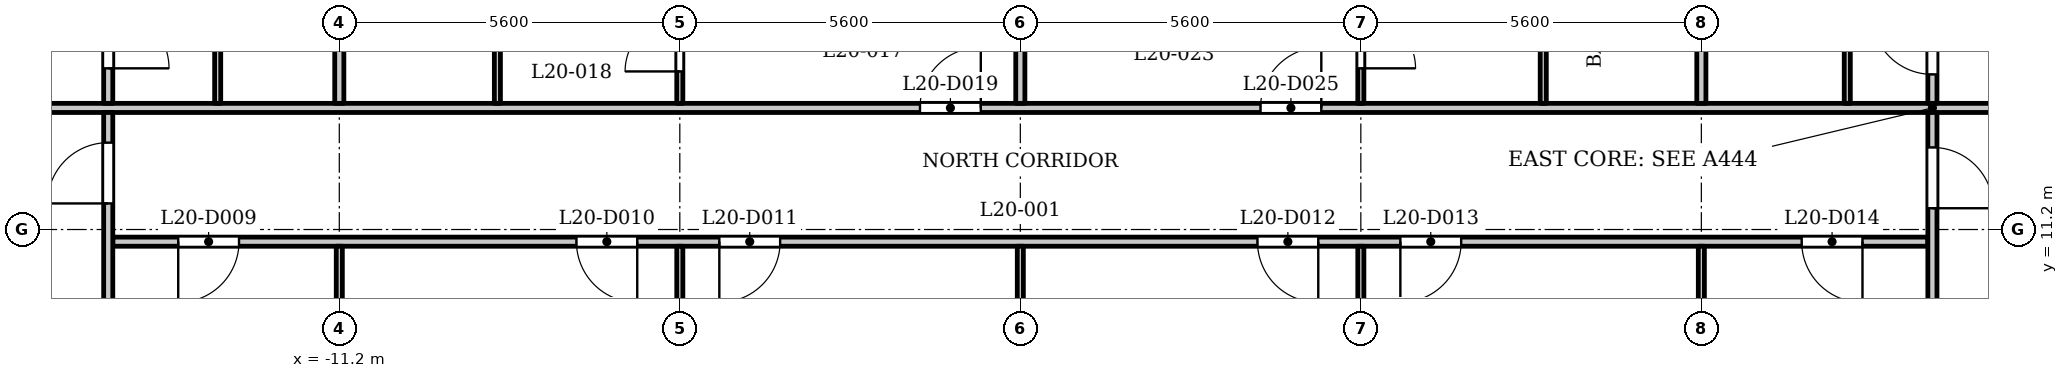
"""IFC4 building model, lengths in metres.
Left out: names, types, materials, properties, quantities, classifications, styles, units other than length and angle.
Written with IfcOpenShell. Run it as: python <this file> out.ifc"""

import sys

from ifc_helpers import new_model, si_unit, direction, frame, frame_2d, origin, place, context, subcontext, project, spatial, rectangle, extrude, element, fill, save


model = new_model("IFC4")
c1 = context("Model", 3, precision=1e-05, world=origin(), true_north=direction((0.0, 1.0)))
c2 = subcontext(c1, "Body", "Model", "MODEL_VIEW")
j1 = project(units=[si_unit("LENGTHUNIT", "METRE"), si_unit("PLANEANGLEUNIT", "RADIAN")], contexts=[c1])
p1 = place(None, origin())
s1 = spatial("IfcSite", under=j1, at=p1, CompositionType="ELEMENT")
p2 = place(p1, origin())
s2 = spatial("IfcBuilding", under=s1, at=p2, CompositionType="ELEMENT")
p3 = place(p2, frame((0.0, 0.0, 83.3)))
s3 = spatial("IfcBuildingStorey", under=s2, at=p3, CompositionType="ELEMENT", Elevation=83.3)
p4 = place(p3, frame((-14.925, 11.0, 0.0), z_axis=(0.0, 0.0, 1.0), x_axis=(1.0, 0.0, 0.0)))
e1 = element("IfcWall", 1, at=p4, inside=s3, PredefinedType="PARTITIONING", context=c2, shape_type="SweptSolid", body=[
    extrude(rectangle(XDim=29.85, YDim=0.15, at=frame_2d((14.925, 0.0))), origin(), (0.0, 0.0, 1.0), 3.2),
])
p5 = place(p4, frame((1.076, 0.0, 0.0)))
e2 = element("IfcOpeningElement", 2, at=p5, cuts=e1, PredefinedType="OPENING", context=c2, shape_type="SweptSolid", body=[
    extrude(rectangle(XDim=1.0, YDim=2.1, at=frame_2d((0.5, 1.05))), frame((0.0, 0.085, 0.0), z_axis=(0.0, -1.0, 0.0), x_axis=(1.0, 0.0, 0.0)), (0.0, 0.0, 1.0), 0.17),
])
p6 = place(p4, frame((7.625, 0.0, 0.0)))
e3 = element("IfcOpeningElement", 3, at=p6, cuts=e1, PredefinedType="OPENING", context=c2, shape_type="SweptSolid", body=[
    extrude(rectangle(XDim=1.0, YDim=2.1, at=frame_2d((0.5, 1.05))), frame((0.0, 0.085, 0.0), z_axis=(0.0, -1.0, 0.0), x_axis=(1.0, 0.0, 0.0)), (0.0, 0.0, 1.0), 0.17),
])
p7 = place(p4, frame((9.975, 0.0, 0.0)))
e4 = element("IfcOpeningElement", 4, at=p7, cuts=e1, PredefinedType="OPENING", context=c2, shape_type="SweptSolid", body=[
    extrude(rectangle(XDim=1.0, YDim=2.1, at=frame_2d((0.5, 1.05))), frame((0.0, 0.085, 0.0), z_axis=(0.0, -1.0, 0.0), x_axis=(1.0, 0.0, 0.0)), (0.0, 0.0, 1.0), 0.17),
])
p8 = place(p4, frame((18.825, 0.0, 0.0)))
e5 = element("IfcOpeningElement", 5, at=p8, cuts=e1, PredefinedType="OPENING", context=c2, shape_type="SweptSolid", body=[
    extrude(rectangle(XDim=1.0, YDim=2.1, at=frame_2d((0.5, 1.05))), frame((0.0, 0.085, 0.0), z_axis=(0.0, -1.0, 0.0), x_axis=(1.0, 0.0, 0.0)), (0.0, 0.0, 1.0), 0.17),
])
p9 = place(p4, frame((21.175, 0.0, 0.0)))
e6 = element("IfcOpeningElement", 6, at=p9, cuts=e1, PredefinedType="OPENING", context=c2, shape_type="SweptSolid", body=[
    extrude(rectangle(XDim=1.0, YDim=2.1, at=frame_2d((0.5, 1.05))), frame((0.0, 0.085, 0.0), z_axis=(0.0, -1.0, 0.0), x_axis=(1.0, 0.0, 0.0)), (0.0, 0.0, 1.0), 0.17),
])
p10 = place(p4, frame((27.775, 0.0, 0.0)))
e7 = element("IfcOpeningElement", 7, at=p10, cuts=e1, PredefinedType="OPENING", context=c2, shape_type="SweptSolid", body=[
    extrude(rectangle(XDim=1.0, YDim=2.1, at=frame_2d((0.5, 1.05))), frame((0.0, 0.085, 0.0), z_axis=(0.0, -1.0, 0.0), x_axis=(1.0, 0.0, 0.0)), (0.0, 0.0, 1.0), 0.17),
])
p11 = place(p3, frame((-17.4, 13.2, 0.0), z_axis=(0.0, 0.0, 1.0), x_axis=(1.0, 0.0, 0.0)))
e8 = element("IfcWall", 8, at=p11, inside=s3, PredefinedType="PARTITIONING", context=c2, shape_type="SweptSolid", body=[
    extrude(rectangle(XDim=34.8, YDim=0.15, at=frame_2d((17.4, 0.0))), origin(), (0.0, 0.0, 1.0), 3.2),
])
p12 = place(p11, frame((0.25, 0.0, 0.0)))
e9 = element("IfcOpeningElement", 9, at=p12, cuts=e8, PredefinedType="OPENING", context=c2, shape_type="SweptSolid", body=[
    extrude(rectangle(XDim=1.0, YDim=2.1, at=frame_2d((0.5, 1.05))), frame((0.0, 0.085, 0.0), z_axis=(0.0, -1.0, 0.0), x_axis=(1.0, 0.0, 0.0)), (0.0, 0.0, 1.0), 0.17),
])
p13 = place(p11, frame((33.65, 0.0, 0.0)))
e10 = element("IfcOpeningElement", 10, at=p13, cuts=e8, PredefinedType="OPENING", context=c2, shape_type="SweptSolid", body=[
    extrude(rectangle(XDim=1.0, YDim=2.1, at=frame_2d((0.5, 1.05))), frame((0.0, 0.085, 0.0), z_axis=(0.0, -1.0, 0.0), x_axis=(1.0, 0.0, 0.0)), (0.0, 0.0, 1.0), 0.17),
])
p14 = place(p11, frame((15.75, 0.0, 0.0)))
e11 = element("IfcOpeningElement", 11, at=p14, cuts=e8, PredefinedType="OPENING", context=c2, shape_type="SweptSolid", body=[
    extrude(rectangle(XDim=1.0, YDim=2.1, at=frame_2d((0.5, 1.05))), frame((0.0, 0.085, 0.0), z_axis=(0.0, -1.0, 0.0), x_axis=(1.0, 0.0, 0.0)), (0.0, 0.0, 1.0), 0.17),
])
p15 = place(p11, frame((21.35, 0.0, 0.0)))
e12 = element("IfcOpeningElement", 12, at=p15, cuts=e8, PredefinedType="OPENING", context=c2, shape_type="SweptSolid", body=[
    extrude(rectangle(XDim=1.0, YDim=2.1, at=frame_2d((0.5, 1.05))), frame((0.0, 0.085, 0.0), z_axis=(0.0, -1.0, 0.0), x_axis=(1.0, 0.0, 0.0)), (0.0, 0.0, 1.0), 0.17),
])
p16 = place(p3, frame((-15.0, 6.769, 0.0), z_axis=(0.0, 0.0, 1.0), x_axis=(0.0, 1.0, 0.0)))
e13 = element("IfcWall", 13, at=p16, inside=s3, PredefinedType="PARTITIONING", context=c2, shape_type="SweptSolid", body=[
    extrude(rectangle(XDim=6.356, YDim=0.15, at=frame_2d((3.178, 0.0))), origin(), (0.0, 0.0, 1.0), 3.2),
])
p17 = place(p16, frame((4.86, 0.0, 0.0)))
e14 = element("IfcOpeningElement", 14, at=p17, cuts=e13, PredefinedType="OPENING", context=c2, shape_type="SweptSolid", body=[
    extrude(rectangle(XDim=1.0, YDim=2.1, at=frame_2d((0.5, 1.05))), frame((0.0, 0.085, 0.0), z_axis=(0.0, -1.0, 0.0), x_axis=(1.0, 0.0, 0.0)), (0.0, 0.0, 1.0), 0.17),
])
p18 = place(p3, frame((-15.0, 13.275, 0.0), z_axis=(0.0, 0.0, 1.0), x_axis=(0.0, 1.0, 0.0)))
e15 = element("IfcWall", 15, at=p18, inside=s3, PredefinedType="PARTITIONING", context=c2, shape_type="SweptSolid", body=[
    extrude(rectangle(XDim=2.05, YDim=0.15, at=frame_2d((1.025, 0.0))), origin(), (0.0, 0.0, 1.0), 3.2),
])
p19 = place(p18, frame((0.576, 0.0, 0.0)))
e16 = element("IfcOpeningElement", 16, at=p19, cuts=e15, PredefinedType="OPENING", context=c2, shape_type="SweptSolid", body=[
    extrude(rectangle(XDim=1.0, YDim=2.1, at=frame_2d((0.5, 1.05))), frame((0.0, 0.085, 0.0), z_axis=(0.0, -1.0, 0.0), x_axis=(1.0, 0.0, 0.0)), (0.0, 0.0, 1.0), 0.17),
])
p20 = place(p3, frame((-13.2, 13.275, 0.0), z_axis=(0.0, 0.0, 1.0), x_axis=(0.0, 1.0, 0.0)))
e17 = element("IfcWall", 17, at=p20, inside=s3, PredefinedType="PARTITIONING", context=c2, shape_type="SweptSolid", body=[
    extrude(rectangle(XDim=3.775, YDim=0.1, at=frame_2d((1.888, 0.0))), origin(), (0.0, 0.0, 1.0), 3.2),
])
p21 = place(p3, frame((-11.2, 7.32, 0.0), z_axis=(0.0, 0.0, 1.0), x_axis=(0.0, 1.0, 0.0)))
e18 = element("IfcWall", 18, at=p21, inside=s3, PredefinedType="PARTITIONING", context=c2, shape_type="SweptSolid", body=[
    extrude(rectangle(XDim=3.605, YDim=0.1, at=frame_2d((1.802, 0.0))), origin(), (0.0, 0.0, 1.0), 3.2),
])
p22 = place(p3, frame((-11.2, 13.275, 0.0), z_axis=(0.0, 0.0, 1.0), x_axis=(0.0, 1.0, 0.0)))
e19 = element("IfcWall", 19, at=p22, inside=s3, PredefinedType="PARTITIONING", context=c2, shape_type="SweptSolid", body=[
    extrude(rectangle(XDim=3.775, YDim=0.15, at=frame_2d((1.888, 0.0))), origin(), (0.0, 0.0, 1.0), 3.2),
])
p23 = place(p3, frame((-8.6, 13.275, 0.0), z_axis=(0.0, 0.0, 1.0), x_axis=(0.0, 1.0, 0.0)))
e20 = element("IfcWall", 20, at=p23, inside=s3, PredefinedType="PARTITIONING", context=c2, shape_type="SweptSolid", body=[
    extrude(rectangle(XDim=3.775, YDim=0.1, at=frame_2d((1.888, 0.0))), origin(), (0.0, 0.0, 1.0), 3.2),
])
p24 = place(p3, frame((-5.6, 7.32, 0.0), z_axis=(0.0, 0.0, 1.0), x_axis=(0.0, 1.0, 0.0)))
e21 = element("IfcWall", 21, at=p24, inside=s3, PredefinedType="PARTITIONING", context=c2, shape_type="SweptSolid", body=[
    extrude(rectangle(XDim=3.605, YDim=0.1, at=frame_2d((1.802, 0.0))), origin(), (0.0, 0.0, 1.0), 3.2),
])
p25 = place(p3, frame((-5.6, 13.275, 0.0), z_axis=(0.0, 0.0, 1.0), x_axis=(0.0, 1.0, 0.0)))
e22 = element("IfcWall", 22, at=p25, inside=s3, PredefinedType="PARTITIONING", context=c2, shape_type="SweptSolid", body=[
    extrude(rectangle(XDim=3.775, YDim=0.1, at=frame_2d((1.888, 0.0))), origin(), (0.0, 0.0, 1.0), 3.2),
])
p26 = place(p25, frame((0.525, 0.0, 0.0)))
e23 = element("IfcOpeningElement", 23, at=p26, cuts=e22, PredefinedType="OPENING", context=c2, shape_type="SweptSolid", body=[
    extrude(rectangle(XDim=0.9, YDim=2.1, at=frame_2d((0.45, 1.05))), frame((0.0, 0.06, 0.0), z_axis=(0.0, -1.0, 0.0), x_axis=(1.0, 0.0, 0.0)), (0.0, 0.0, 1.0), 0.12),
])
p27 = place(p3, frame((0.0, 7.32, 0.0), z_axis=(0.0, 0.0, 1.0), x_axis=(0.0, 1.0, 0.0)))
e24 = element("IfcWall", 24, at=p27, inside=s3, PredefinedType="PARTITIONING", context=c2, shape_type="SweptSolid", body=[
    extrude(rectangle(XDim=3.605, YDim=0.1, at=frame_2d((1.802, 0.0))), origin(), (0.0, 0.0, 1.0), 3.2),
])
p28 = place(p3, frame((0.0, 13.275, 0.0), z_axis=(0.0, 0.0, 1.0), x_axis=(0.0, 1.0, 0.0)))
e25 = element("IfcWall", 25, at=p28, inside=s3, PredefinedType="PARTITIONING", context=c2, shape_type="SweptSolid", body=[
    extrude(rectangle(XDim=3.775, YDim=0.15, at=frame_2d((1.888, 0.0))), origin(), (0.0, 0.0, 1.0), 3.2),
])
p29 = place(p3, frame((5.6, 7.32, 0.0), z_axis=(0.0, 0.0, 1.0), x_axis=(0.0, 1.0, 0.0)))
e26 = element("IfcWall", 26, at=p29, inside=s3, PredefinedType="PARTITIONING", context=c2, shape_type="SweptSolid", body=[
    extrude(rectangle(XDim=3.605, YDim=0.1, at=frame_2d((1.802, 0.0))), origin(), (0.0, 0.0, 1.0), 3.2),
])
p30 = place(p3, frame((5.6, 13.275, 0.0), z_axis=(0.0, 0.0, 1.0), x_axis=(0.0, 1.0, 0.0)))
e27 = element("IfcWall", 27, at=p30, inside=s3, PredefinedType="PARTITIONING", context=c2, shape_type="SweptSolid", body=[
    extrude(rectangle(XDim=3.775, YDim=0.1, at=frame_2d((1.888, 0.0))), origin(), (0.0, 0.0, 1.0), 3.2),
])
p31 = place(p30, frame((0.576, 0.0, 0.0)))
e28 = element("IfcOpeningElement", 28, at=p31, cuts=e27, PredefinedType="OPENING", context=c2, shape_type="SweptSolid", body=[
    extrude(rectangle(XDim=0.9, YDim=2.1, at=frame_2d((0.45, 1.05))), frame((0.0, 0.06, 0.0), z_axis=(0.0, -1.0, 0.0), x_axis=(1.0, 0.0, 0.0)), (0.0, 0.0, 1.0), 0.12),
])
p32 = place(p3, frame((8.6, 13.275, 0.0), z_axis=(0.0, 0.0, 1.0), x_axis=(0.0, 1.0, 0.0)))
e29 = element("IfcWall", 29, at=p32, inside=s3, PredefinedType="PARTITIONING", context=c2, shape_type="SweptSolid", body=[
    extrude(rectangle(XDim=3.775, YDim=0.1, at=frame_2d((1.888, 0.0))), origin(), (0.0, 0.0, 1.0), 3.2),
])
p33 = place(p3, frame((11.2, 7.32, 0.0), z_axis=(0.0, 0.0, 1.0), x_axis=(0.0, 1.0, 0.0)))
e30 = element("IfcWall", 30, at=p33, inside=s3, PredefinedType="PARTITIONING", context=c2, shape_type="SweptSolid", body=[
    extrude(rectangle(XDim=3.605, YDim=0.1, at=frame_2d((1.802, 0.0))), origin(), (0.0, 0.0, 1.0), 3.2),
])
p34 = place(p3, frame((11.2, 13.275, 0.0), z_axis=(0.0, 0.0, 1.0), x_axis=(0.0, 1.0, 0.0)))
e31 = element("IfcWall", 31, at=p34, inside=s3, PredefinedType="PARTITIONING", context=c2, shape_type="SweptSolid", body=[
    extrude(rectangle(XDim=3.775, YDim=0.15, at=frame_2d((1.888, 0.0))), origin(), (0.0, 0.0, 1.0), 3.2),
])
p35 = place(p3, frame((13.6, 13.275, 0.0), z_axis=(0.0, 0.0, 1.0), x_axis=(0.0, 1.0, 0.0)))
e32 = element("IfcWall", 32, at=p35, inside=s3, PredefinedType="PARTITIONING", context=c2, shape_type="SweptSolid", body=[
    extrude(rectangle(XDim=3.775, YDim=0.1, at=frame_2d((1.888, 0.0))), origin(), (0.0, 0.0, 1.0), 3.2),
])
p36 = place(p3, frame((15.0, 6.769, 0.0), z_axis=(0.0, 0.0, 1.0), x_axis=(0.0, 1.0, 0.0)))
e33 = element("IfcWall", 33, at=p36, inside=s3, PredefinedType="PARTITIONING", context=c2, shape_type="SweptSolid", body=[
    extrude(rectangle(XDim=6.356, YDim=0.15, at=frame_2d((3.178, 0.0))), origin(), (0.0, 0.0, 1.0), 3.2),
])
p37 = place(p36, frame((4.781, 0.0, 0.0)))
e34 = element("IfcOpeningElement", 34, at=p37, cuts=e33, PredefinedType="OPENING", context=c2, shape_type="SweptSolid", body=[
    extrude(rectangle(XDim=1.0, YDim=2.1, at=frame_2d((0.5, 1.05))), frame((0.0, 0.085, 0.0), z_axis=(0.0, -1.0, 0.0), x_axis=(1.0, 0.0, 0.0)), (0.0, 0.0, 1.0), 0.17),
])
p38 = place(p3, frame((15.0, 13.275, 0.0), z_axis=(0.0, 0.0, 1.0), x_axis=(0.0, 1.0, 0.0)))
e35 = element("IfcWall", 35, at=p38, inside=s3, PredefinedType="PARTITIONING", context=c2, shape_type="SweptSolid", body=[
    extrude(rectangle(XDim=2.05, YDim=0.15, at=frame_2d((1.025, 0.0))), origin(), (0.0, 0.0, 1.0), 3.2),
])
p39 = place(p38, frame((0.476, 0.0, 0.0)))
e36 = element("IfcOpeningElement", 36, at=p39, cuts=e35, PredefinedType="OPENING", context=c2, shape_type="SweptSolid", body=[
    extrude(rectangle(XDim=1.0, YDim=2.1, at=frame_2d((0.5, 1.05))), frame((0.0, 0.085, 0.0), z_axis=(0.0, -1.0, 0.0), x_axis=(1.0, 0.0, 0.0)), (0.0, 0.0, 1.0), 0.17),
])
p40 = place(p17, origin())
e37 = element("IfcDoor", 37, at=p40, inside=s3, OperationType="SINGLE_SWING_RIGHT", PredefinedType="DOOR", context=c2, shape_type="SweptSolid", body=[
    extrude(rectangle(XDim=1.0, YDim=2.1, at=frame_2d((0.5, 1.05))), frame((0.0, 0.025, 0.0), z_axis=(0.0, -1.0, 0.0), x_axis=(1.0, 0.0, 0.0)), (0.0, 0.0, 1.0), 0.05),
])
fill(e14, e37)
p41 = place(p37, origin())
e38 = element("IfcDoor", 38, at=p41, inside=s3, OperationType="SINGLE_SWING_LEFT", PredefinedType="DOOR", context=c2, shape_type="SweptSolid", body=[
    extrude(rectangle(XDim=1.0, YDim=2.1, at=frame_2d((0.5, 1.05))), frame((0.0, 0.025, 0.0), z_axis=(0.0, -1.0, 0.0), x_axis=(1.0, 0.0, 0.0)), (0.0, 0.0, 1.0), 0.05),
])
fill(e34, e38)
p42 = place(p5, origin())
e39 = element("IfcDoor", 39, at=p42, inside=s3, OperationType="SINGLE_SWING_LEFT", PredefinedType="DOOR", context=c2, shape_type="SweptSolid", body=[
    extrude(rectangle(XDim=1.0, YDim=2.1, at=frame_2d((0.5, 1.05))), frame((0.0, 0.025, 0.0), z_axis=(0.0, -1.0, 0.0), x_axis=(1.0, 0.0, 0.0)), (0.0, 0.0, 1.0), 0.05),
])
fill(e2, e39)
p43 = place(p6, origin())
e40 = element("IfcDoor", 40, at=p43, inside=s3, OperationType="SINGLE_SWING_RIGHT", PredefinedType="DOOR", context=c2, shape_type="SweptSolid", body=[
    extrude(rectangle(XDim=1.0, YDim=2.1, at=frame_2d((0.5, 1.05))), frame((0.0, 0.025, 0.0), z_axis=(0.0, -1.0, 0.0), x_axis=(1.0, 0.0, 0.0)), (0.0, 0.0, 1.0), 0.05),
])
fill(e3, e40)
p44 = place(p7, origin())
e41 = element("IfcDoor", 41, at=p44, inside=s3, OperationType="SINGLE_SWING_LEFT", PredefinedType="DOOR", context=c2, shape_type="SweptSolid", body=[
    extrude(rectangle(XDim=1.0, YDim=2.1, at=frame_2d((0.5, 1.05))), frame((0.0, 0.025, 0.0), z_axis=(0.0, -1.0, 0.0), x_axis=(1.0, 0.0, 0.0)), (0.0, 0.0, 1.0), 0.05),
])
fill(e4, e41)
p45 = place(p8, origin())
e42 = element("IfcDoor", 42, at=p45, inside=s3, OperationType="SINGLE_SWING_RIGHT", PredefinedType="DOOR", context=c2, shape_type="SweptSolid", body=[
    extrude(rectangle(XDim=1.0, YDim=2.1, at=frame_2d((0.5, 1.05))), frame((0.0, 0.025, 0.0), z_axis=(0.0, -1.0, 0.0), x_axis=(1.0, 0.0, 0.0)), (0.0, 0.0, 1.0), 0.05),
])
fill(e5, e42)
p46 = place(p9, origin())
e43 = element("IfcDoor", 43, at=p46, inside=s3, OperationType="SINGLE_SWING_LEFT", PredefinedType="DOOR", context=c2, shape_type="SweptSolid", body=[
    extrude(rectangle(XDim=1.0, YDim=2.1, at=frame_2d((0.5, 1.05))), frame((0.0, 0.025, 0.0), z_axis=(0.0, -1.0, 0.0), x_axis=(1.0, 0.0, 0.0)), (0.0, 0.0, 1.0), 0.05),
])
fill(e6, e43)
p47 = place(p10, origin())
e44 = element("IfcDoor", 44, at=p47, inside=s3, OperationType="SINGLE_SWING_RIGHT", PredefinedType="DOOR", context=c2, shape_type="SweptSolid", body=[
    extrude(rectangle(XDim=1.0, YDim=2.1, at=frame_2d((0.5, 1.05))), frame((0.0, 0.025, 0.0), z_axis=(0.0, -1.0, 0.0), x_axis=(1.0, 0.0, 0.0)), (0.0, 0.0, 1.0), 0.05),
])
fill(e7, e44)
p48 = place(p19, origin())
e45 = element("IfcDoor", 45, at=p48, inside=s3, OperationType="SINGLE_SWING_LEFT", PredefinedType="DOOR", context=c2, shape_type="SweptSolid", body=[
    extrude(rectangle(XDim=1.0, YDim=2.1, at=frame_2d((0.5, 1.05))), frame((0.0, 0.025, 0.0), z_axis=(0.0, -1.0, 0.0), x_axis=(1.0, 0.0, 0.0)), (0.0, 0.0, 1.0), 0.05),
])
fill(e16, e45)
p49 = place(p14, origin())
e46 = element("IfcDoor", 46, at=p49, inside=s3, OperationType="SINGLE_SWING_LEFT", PredefinedType="DOOR", context=c2, shape_type="SweptSolid", body=[
    extrude(rectangle(XDim=1.0, YDim=2.1, at=frame_2d((0.5, 1.05))), frame((0.0, 0.025, 0.0), z_axis=(0.0, -1.0, 0.0), x_axis=(1.0, 0.0, 0.0)), (0.0, 0.0, 1.0), 0.05),
])
fill(e11, e46)
p50 = place(p26, origin())
e47 = element("IfcDoor", 47, at=p50, inside=s3, OperationType="SINGLE_SWING_RIGHT", PredefinedType="DOOR", context=c2, shape_type="SweptSolid", body=[
    extrude(rectangle(XDim=0.9, YDim=2.1, at=frame_2d((0.45, 1.05))), frame((0.0, 0.025, 0.0), z_axis=(0.0, -1.0, 0.0), x_axis=(1.0, 0.0, 0.0)), (0.0, 0.0, 1.0), 0.05),
])
fill(e23, e47)
p51 = place(p15, origin())
e48 = element("IfcDoor", 48, at=p51, inside=s3, OperationType="SINGLE_SWING_LEFT", PredefinedType="DOOR", context=c2, shape_type="SweptSolid", body=[
    extrude(rectangle(XDim=1.0, YDim=2.1, at=frame_2d((0.5, 1.05))), frame((0.0, 0.025, 0.0), z_axis=(0.0, -1.0, 0.0), x_axis=(1.0, 0.0, 0.0)), (0.0, 0.0, 1.0), 0.05),
])
fill(e12, e48)
p52 = place(p31, origin())
e49 = element("IfcDoor", 49, at=p52, inside=s3, OperationType="SINGLE_SWING_LEFT", PredefinedType="DOOR", context=c2, shape_type="SweptSolid", body=[
    extrude(rectangle(XDim=0.9, YDim=2.1, at=frame_2d((0.45, 1.05))), frame((0.0, 0.025, 0.0), z_axis=(0.0, -1.0, 0.0), x_axis=(1.0, 0.0, 0.0)), (0.0, 0.0, 1.0), 0.05),
])
fill(e28, e49)
p53 = place(p39, origin())
e50 = element("IfcDoor", 50, at=p53, inside=s3, OperationType="SINGLE_SWING_LEFT", PredefinedType="DOOR", context=c2, shape_type="SweptSolid", body=[
    extrude(rectangle(XDim=1.0, YDim=2.1, at=frame_2d((0.5, 1.05))), frame((0.0, 0.025, 0.0), z_axis=(0.0, -1.0, 0.0), x_axis=(1.0, 0.0, 0.0)), (0.0, 0.0, 1.0), 0.05),
])
fill(e36, e50)
save(model, sys.argv[1])
